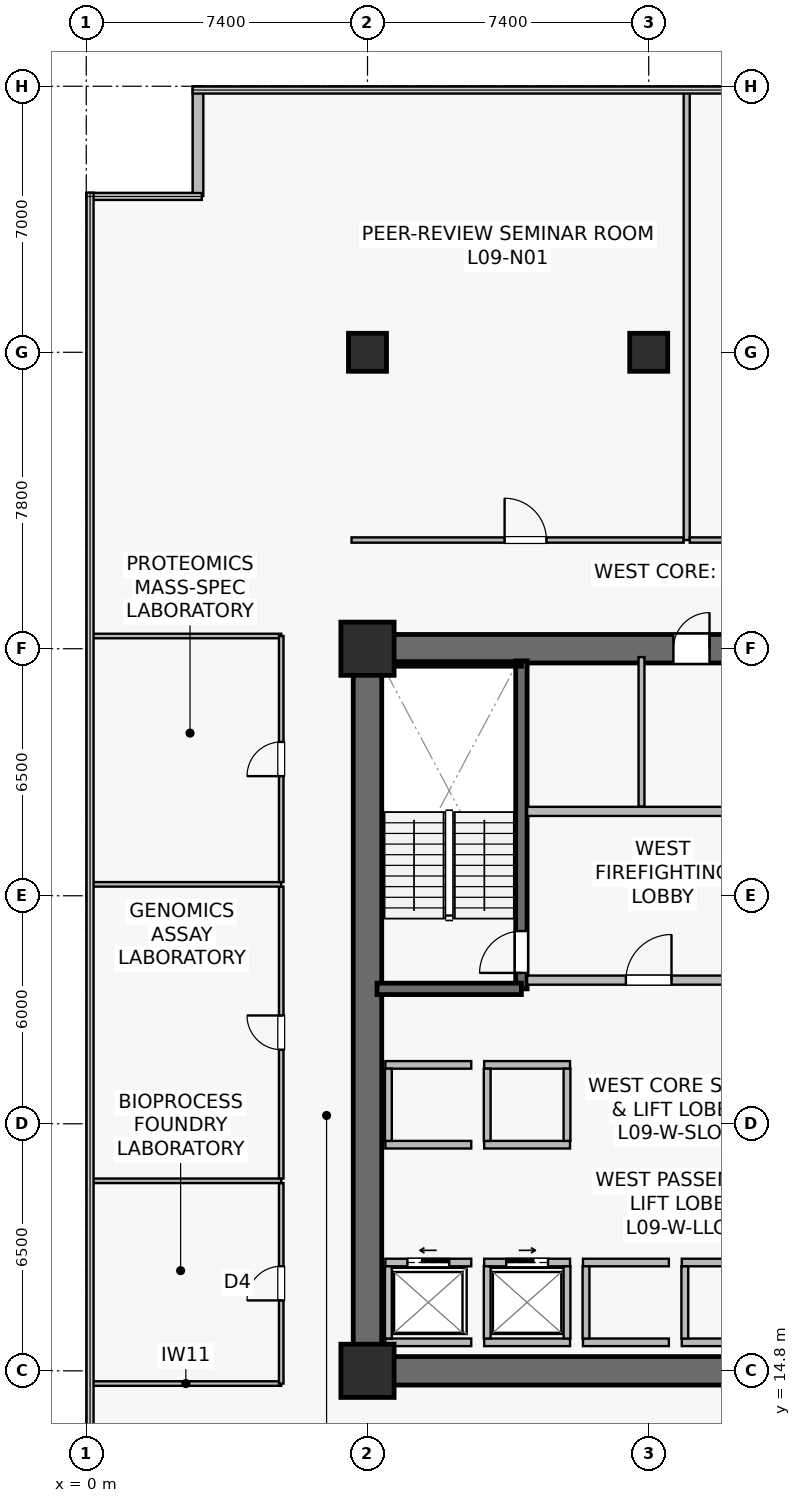
"""IFC4 building model, lengths in metres.
Left out: names, types, materials, properties, quantities, classifications, styles, units other than length and angle.
Written with IfcOpenShell. Run it as: python <this file> out.ifc"""

import sys

from ifc_helpers import new_model, si_unit, direction, frame, frame_2d, origin, origin_2d, place, context, subcontext, project, spatial, rectangle, extrude, source, transform, mapped, element, fill, save


model = new_model("IFC4")
c1 = context("Model", 3, precision=1e-05, world=origin(), true_north=direction((0.0, 1.0)))
c2 = subcontext(c1, "Body", "Model", "MODEL_VIEW")
j1 = project(units=[si_unit("LENGTHUNIT", "METRE"), si_unit("PLANEANGLEUNIT", "RADIAN")], contexts=[c1])
p1 = place(None, origin())
s1 = spatial("IfcSite", under=j1, at=p1, CompositionType="ELEMENT")
p2 = place(p1, origin())
s2 = spatial("IfcBuilding", under=s1, at=p2, CompositionType="ELEMENT")
p3 = place(p2, frame((0.0, 0.0, 37.5)))
s3 = spatial("IfcBuildingStorey", under=s2, at=p3, CompositionType="ELEMENT", Elevation=37.5)
p4 = place(p3, frame((7.025, 14.8, 0.0), z_axis=(0.0, 0.0, 1.0), x_axis=(1.0, 0.0, 0.0)))
e1 = element("IfcWall", 1, at=p4, inside=s3, PredefinedType="SHEAR", context=c2, shape_type="SweptSolid", body=[
    extrude(rectangle(XDim=15.55, YDim=0.75, at=frame_2d((7.775, 0.0))), origin(), (0.0, 0.0, 1.0), 3.78),
])
p5 = place(p3, frame((7.025, 33.8, 0.0), z_axis=(0.0, 0.0, 1.0), x_axis=(1.0, 0.0, 0.0)))
e2 = element("IfcWall", 2, at=p5, inside=s3, PredefinedType="SHEAR", context=c2, shape_type="SweptSolid", body=[
    extrude(rectangle(XDim=15.55, YDim=0.75, at=frame_2d((7.775, 0.0))), origin(), (0.0, 0.0, 1.0), 3.78),
])
p6 = place(p5, frame((8.425, 0.0, 0.0)))
e3 = element("IfcOpeningElement", 3, at=p6, cuts=e2, PredefinedType="OPENING", context=c2, shape_type="SweptSolid", body=[
    extrude(rectangle(XDim=0.95, YDim=2.15, at=frame_2d((0.475, 1.075))), frame((0.0, 0.385, 0.0), z_axis=(0.0, -1.0, 0.0), x_axis=(1.0, 0.0, 0.0)), (0.0, 0.0, 1.0), 0.77),
])
p7 = place(p5, frame((11.965, 0.0, 0.0)))
e4 = element("IfcOpeningElement", 4, at=p7, cuts=e2, PredefinedType="OPENING", context=c2, shape_type="SweptSolid", body=[
    extrude(rectangle(XDim=0.95, YDim=2.15, at=frame_2d((0.475, 1.075))), frame((0.0, 0.385, 0.0), z_axis=(0.0, -1.0, 0.0), x_axis=(1.0, 0.0, 0.0)), (0.0, 0.0, 1.0), 0.77),
])
p8 = place(p3, frame((7.4, 15.175, 0.0), z_axis=(0.0, 0.0, 1.0), x_axis=(0.0, 1.0, 0.0)))
e5 = element("IfcWall", 5, at=p8, inside=s3, PredefinedType="SHEAR", context=c2, shape_type="SweptSolid", body=[
    extrude(rectangle(XDim=18.25, YDim=0.75, at=frame_2d((9.125, 0.0))), origin(), (0.0, 0.0, 1.0), 3.78),
])
p9 = place(p3, frame((11.45, 24.85, 0.0), z_axis=(0.0, 0.0, 1.0), x_axis=(0.0, 1.0, 0.0)))
e6 = element("IfcWall", 6, at=p9, inside=s3, PredefinedType="SHEAR", context=c2, shape_type="SweptSolid", body=[
    extrude(rectangle(XDim=8.63, YDim=0.3, at=frame_2d((4.315, 0.0))), origin(), (0.0, 0.0, 1.0), 3.78),
])
p10 = place(p9, frame((0.42, 0.0, 0.0)))
e7 = element("IfcOpeningElement", 7, at=p10, cuts=e6, PredefinedType="OPENING", context=c2, shape_type="SweptSolid", body=[
    extrude(rectangle(XDim=1.1, YDim=2.15, at=frame_2d((0.55, 1.075))), frame((0.0, 0.16, 0.0), z_axis=(0.0, -1.0, 0.0), x_axis=(1.0, 0.0, 0.0)), (0.0, 0.0, 1.0), 0.32),
])
p11 = place(p3, frame((7.65, 24.85, 0.0), z_axis=(0.0, 0.0, 1.0), x_axis=(1.0, 0.0, 0.0)))
e8 = element("IfcWall", 8, at=p11, inside=s3, PredefinedType="SHEAR", context=c2, shape_type="SweptSolid", body=[
    extrude(rectangle(XDim=3.8, YDim=0.3, at=frame_2d((1.9, 0.0))), origin(), (0.0, 0.0, 1.0), 3.78),
])
p12 = place(p3, frame((7.73, 33.4, 0.0), z_axis=(0.0, 0.0, 1.0), x_axis=(1.0, 0.0, 0.0)))
e9 = element("IfcWall", 9, at=p12, inside=s3, PredefinedType="SOLIDWALL", context=c2, shape_type="SweptSolid", body=[
    extrude(rectangle(XDim=3.72, YDim=0.12, at=frame_2d((1.86, 0.0))), origin(), (0.0, 0.0, 1.0), 3.78),
])
m1 = source(origin(), c2, "Body", "SweptSolid", [
    extrude(rectangle(XDim=1.4, YDim=1.4, at=origin_2d()), origin(), (0.0, 0.0, 1.0), 4.1),
])
for number, where, z_axis, x_axis in (
    (10, (7.4, 14.8, 0.0), (0.0, 0.0, 1.0), (1.0, 0.0, 0.0)),
    (11, (7.4, 33.8, 0.0), (0.0, 0.0, 1.0), (1.0, 0.0, 0.0)),
):
    element("IfcColumn", number, at=place(p3, frame(where, z_axis=z_axis, x_axis=x_axis)), inside=s3, PredefinedType="COLUMN", context=c2, shape_type="MappedRepresentation", body=[
        mapped(m1, transform((0.0, 0.0, 0.0), scale=1.0)),
    ])
m2 = source(origin(), c2, "Body", "SweptSolid", [
    extrude(rectangle(XDim=1.0, YDim=1.0, at=origin_2d()), origin(), (0.0, 0.0, 1.0), 4.1),
])
for number, where, z_axis, x_axis in (
    (12, (14.8, 41.6, 0.0), (0.0, 0.0, 1.0), (1.0, 0.0, 0.0)),
    (13, (7.4, 41.6, 0.0), (0.0, 0.0, 1.0), (1.0, 0.0, 0.0)),
):
    element("IfcColumn", number, at=place(p3, frame(where, z_axis=z_axis, x_axis=x_axis)), inside=s3, PredefinedType="COLUMN", context=c2, shape_type="MappedRepresentation", body=[
        mapped(m2, transform((0.0, 0.0, 0.0), scale=1.0)),
    ])
p13 = place(p3, frame((2.94, 48.6, 0.0), z_axis=(0.0, 0.0, 1.0), x_axis=(0.0, -1.0, 0.0)))
e14 = element("IfcWall", 14, at=p13, inside=s3, PredefinedType="STANDARD", context=c2, shape_type="SweptSolid", body=[
    extrude(rectangle(XDim=2.888, YDim=0.28, at=frame_2d((1.444, 0.0))), origin(), (0.0, 0.0, 1.0), 3.78),
])
p14 = place(p3, frame((11.6, 25.08, 0.0), z_axis=(0.0, 0.0, 1.0), x_axis=(1.0, 0.0, 0.0)))
e15 = element("IfcWall", 15, at=p14, inside=s3, PredefinedType="SOLIDWALL", context=c2, shape_type="SweptSolid", body=[
    extrude(rectangle(XDim=6.92, YDim=0.24, at=frame_2d((3.46, 0.0))), origin(), (0.0, 0.0, 1.0), 3.065),
])
p15 = place(p14, frame((2.6, 0.0, 0.0)))
e16 = element("IfcOpeningElement", 16, at=p15, cuts=e15, PredefinedType="OPENING", context=c2, shape_type="SweptSolid", body=[
    extrude(rectangle(XDim=1.2, YDim=2.16, at=frame_2d((0.6, 1.08))), frame((0.0, 0.13, 0.0), z_axis=(0.0, -1.0, 0.0), x_axis=(1.0, 0.0, 0.0)), (0.0, 0.0, 1.0), 0.26),
])
p16 = place(p3, frame((11.6, 29.52, 0.0), z_axis=(0.0, 0.0, 1.0), x_axis=(1.0, 0.0, 0.0)))
e17 = element("IfcWall", 17, at=p16, inside=s3, PredefinedType="SOLIDWALL", context=c2, shape_type="SweptSolid", body=[
    extrude(rectangle(XDim=6.92, YDim=0.24, at=frame_2d((3.46, 0.0))), origin(), (0.0, 0.0, 1.0), 3.065),
])
p17 = place(p3, frame((7.87, 17.65, 0.0), z_axis=(0.0, 0.0, 1.0), x_axis=(1.0, 0.0, 0.0)))
e18 = element("IfcWall", 18, at=p17, inside=s3, PredefinedType="SOLIDWALL", context=c2, shape_type="SweptSolid", body=[
    extrude(rectangle(XDim=2.26, YDim=0.2, at=frame_2d((1.13, 0.0))), origin(), (0.0, 0.0, 1.0), 3.78),
])
p18 = place(p17, frame((0.58, 0.0, 0.0)))
e19 = element("IfcOpeningElement", 19, at=p18, cuts=e18, PredefinedType="OPENING", context=c2, shape_type="SweptSolid", body=[
    extrude(rectangle(XDim=1.1, YDim=2.22, at=frame_2d((0.55, 1.11))), frame((0.0, 0.11, 0.0), z_axis=(0.0, -1.0, 0.0), x_axis=(1.0, 0.0, 0.0)), (0.0, 0.0, 1.0), 0.22),
])
p19 = place(p3, frame((7.87, 15.55, 0.0), z_axis=(0.0, 0.0, 1.0), x_axis=(1.0, 0.0, 0.0)))
e20 = element("IfcWall", 20, at=p19, inside=s3, PredefinedType="SOLIDWALL", context=c2, shape_type="SweptSolid", body=[
    extrude(rectangle(XDim=2.26, YDim=0.2, at=frame_2d((1.13, 0.0))), origin(), (0.0, 0.0, 1.0), 3.78),
])
p20 = place(p3, frame((7.95, 15.65, 0.0), z_axis=(0.0, 0.0, 1.0), x_axis=(0.0, 1.0, 0.0)))
e21 = element("IfcWall", 21, at=p20, inside=s3, PredefinedType="SOLIDWALL", context=c2, shape_type="SweptSolid", body=[
    extrude(rectangle(XDim=1.9, YDim=0.18, at=frame_2d((0.95, 0.0))), origin(), (0.0, 0.0, 1.0), 3.78),
])
p21 = place(p3, frame((10.47, 17.65, 0.0), z_axis=(0.0, 0.0, 1.0), x_axis=(1.0, 0.0, 0.0)))
e22 = element("IfcWall", 22, at=p21, inside=s3, PredefinedType="SOLIDWALL", context=c2, shape_type="SweptSolid", body=[
    extrude(rectangle(XDim=2.26, YDim=0.2, at=frame_2d((1.13, 0.0))), origin(), (0.0, 0.0, 1.0), 3.78),
])
p22 = place(p21, frame((0.58, 0.0, 0.0)))
e23 = element("IfcOpeningElement", 23, at=p22, cuts=e22, PredefinedType="OPENING", context=c2, shape_type="SweptSolid", body=[
    extrude(rectangle(XDim=1.1, YDim=2.22, at=frame_2d((0.55, 1.11))), frame((0.0, 0.11, 0.0), z_axis=(0.0, -1.0, 0.0), x_axis=(1.0, 0.0, 0.0)), (0.0, 0.0, 1.0), 0.22),
])
p23 = place(p3, frame((10.47, 15.55, 0.0), z_axis=(0.0, 0.0, 1.0), x_axis=(1.0, 0.0, 0.0)))
e24 = element("IfcWall", 24, at=p23, inside=s3, PredefinedType="SOLIDWALL", context=c2, shape_type="SweptSolid", body=[
    extrude(rectangle(XDim=2.26, YDim=0.2, at=frame_2d((1.13, 0.0))), origin(), (0.0, 0.0, 1.0), 3.78),
])
for number, where, z_axis, x_axis in (
    (25, (10.55, 15.65, 0.0), (0.0, 0.0, 1.0), (0.0, 1.0, 0.0)),
    (26, (12.65, 15.65, 0.0), (0.0, 0.0, 1.0), (0.0, 1.0, 0.0)),
):
    element("IfcWall", number, at=place(p3, frame(where, z_axis=z_axis, x_axis=x_axis)), inside=s3, PredefinedType="SOLIDWALL", context=c2, shape_type="SweptSolid", body=[
        extrude(rectangle(XDim=1.9, YDim=0.18, at=frame_2d((0.95, 0.0))), origin(), (0.0, 0.0, 1.0), 3.78),
    ])
for number, where, z_axis, x_axis in (
    (27, (13.07, 17.65, 0.0), (0.0, 0.0, 1.0), (1.0, 0.0, 0.0)),
    (28, (13.07, 15.55, 0.0), (0.0, 0.0, 1.0), (1.0, 0.0, 0.0)),
):
    element("IfcWall", number, at=place(p3, frame(where, z_axis=z_axis, x_axis=x_axis)), inside=s3, PredefinedType="SOLIDWALL", context=c2, shape_type="SweptSolid", body=[
        extrude(rectangle(XDim=2.26, YDim=0.2, at=frame_2d((1.13, 0.0))), origin(), (0.0, 0.0, 1.0), 3.065),
    ])
p24 = place(p3, frame((13.15, 15.65, 0.0), z_axis=(0.0, 0.0, 1.0), x_axis=(0.0, 1.0, 0.0)))
e29 = element("IfcWall", 29, at=p24, inside=s3, PredefinedType="SOLIDWALL", context=c2, shape_type="SweptSolid", body=[
    extrude(rectangle(XDim=1.9, YDim=0.18, at=frame_2d((0.95, 0.0))), origin(), (0.0, 0.0, 1.0), 3.78),
])
for number, where, z_axis, x_axis in (
    (30, (15.67, 17.65, 0.0), (0.0, 0.0, 1.0), (1.0, 0.0, 0.0)),
    (31, (15.67, 15.55, 0.0), (0.0, 0.0, 1.0), (1.0, 0.0, 0.0)),
):
    element("IfcWall", number, at=place(p3, frame(where, z_axis=z_axis, x_axis=x_axis)), inside=s3, PredefinedType="SOLIDWALL", context=c2, shape_type="SweptSolid", body=[
        extrude(rectangle(XDim=2.26, YDim=0.2, at=frame_2d((1.13, 0.0))), origin(), (0.0, 0.0, 1.0), 3.78),
    ])
p25 = place(p3, frame((15.75, 15.65, 0.0), z_axis=(0.0, 0.0, 1.0), x_axis=(0.0, 1.0, 0.0)))
e32 = element("IfcWall", 32, at=p25, inside=s3, PredefinedType="SOLIDWALL", context=c2, shape_type="SweptSolid", body=[
    extrude(rectangle(XDim=1.9, YDim=0.18, at=frame_2d((0.95, 0.0))), origin(), (0.0, 0.0, 1.0), 3.78),
])
for number, where, z_axis, x_axis in (
    (33, (7.87, 20.75, 0.0), (0.0, 0.0, 1.0), (1.0, 0.0, 0.0)),
    (34, (7.87, 22.85, 0.0), (0.0, 0.0, 1.0), (1.0, 0.0, 0.0)),
):
    element("IfcWall", number, at=place(p3, frame(where, z_axis=z_axis, x_axis=x_axis)), inside=s3, PredefinedType="SOLIDWALL", context=c2, shape_type="SweptSolid", body=[
        extrude(rectangle(XDim=2.26, YDim=0.2, at=frame_2d((1.13, 0.0))), origin(), (0.0, 0.0, 1.0), 3.78),
    ])
p26 = place(p3, frame((7.95, 20.85, 0.0), z_axis=(0.0, 0.0, 1.0), x_axis=(0.0, 1.0, 0.0)))
e35 = element("IfcWall", 35, at=p26, inside=s3, PredefinedType="SOLIDWALL", context=c2, shape_type="SweptSolid", body=[
    extrude(rectangle(XDim=1.9, YDim=0.18, at=frame_2d((0.95, 0.0))), origin(), (0.0, 0.0, 1.0), 3.78),
])
for number, where, z_axis, x_axis in (
    (36, (10.47, 20.75, 0.0), (0.0, 0.0, 1.0), (1.0, 0.0, 0.0)),
    (37, (10.47, 22.85, 0.0), (0.0, 0.0, 1.0), (1.0, 0.0, 0.0)),
):
    element("IfcWall", number, at=place(p3, frame(where, z_axis=z_axis, x_axis=x_axis)), inside=s3, PredefinedType="SOLIDWALL", context=c2, shape_type="SweptSolid", body=[
        extrude(rectangle(XDim=2.26, YDim=0.2, at=frame_2d((1.13, 0.0))), origin(), (0.0, 0.0, 1.0), 3.78),
    ])
for number, where, z_axis, x_axis in (
    (38, (10.55, 20.85, 0.0), (0.0, 0.0, 1.0), (0.0, 1.0, 0.0)),
    (39, (12.65, 20.85, 0.0), (0.0, 0.0, 1.0), (0.0, 1.0, 0.0)),
):
    element("IfcWall", number, at=place(p3, frame(where, z_axis=z_axis, x_axis=x_axis)), inside=s3, PredefinedType="SOLIDWALL", context=c2, shape_type="SweptSolid", body=[
        extrude(rectangle(XDim=1.9, YDim=0.18, at=frame_2d((0.95, 0.0))), origin(), (0.0, 0.0, 1.0), 3.78),
    ])
p27 = place(p3, frame((14.61, 29.65, 0.0), z_axis=(0.0, 0.0, 1.0), x_axis=(0.0, 1.0, 0.0)))
e40 = element("IfcWall", 40, at=p27, inside=s3, PredefinedType="PLUMBINGWALL", context=c2, shape_type="SweptSolid", body=[
    extrude(rectangle(XDim=3.93, YDim=0.155, at=frame_2d((1.965, 0.0))), origin(), (0.0, 0.0, 1.0), 3.065),
])
p28 = place(p3, frame((6.98, 36.66, 0.0), z_axis=(0.0, 0.0, 1.0), x_axis=(1.0, 0.0, 0.0)))
e41 = element("IfcWall", 41, at=p28, inside=s3, PredefinedType="PARTITIONING", context=c2, shape_type="SweptSolid", body=[
    extrude(rectangle(XDim=8.74, YDim=0.14, at=frame_2d((4.37, 0.0))), origin(), (0.0, 0.0, 1.0), 3.065),
])
p29 = place(p28, frame((4.028, 0.0, 0.0)))
e42 = element("IfcOpeningElement", 42, at=p29, cuts=e41, PredefinedType="OPENING", context=c2, shape_type="SweptSolid", body=[
    extrude(rectangle(XDim=1.1, YDim=2.18, at=frame_2d((0.55, 1.09))), frame((0.0, 0.08, 0.0), z_axis=(0.0, -1.0, 0.0), x_axis=(1.0, 0.0, 0.0)), (0.0, 0.0, 1.0), 0.16),
])
p30 = place(p3, frame((15.8, 36.66, 0.0), z_axis=(0.0, 0.0, 1.0), x_axis=(0.0, 1.0, 0.0)))
e43 = element("IfcWall", 43, at=p30, inside=s3, PredefinedType="PARTITIONING", context=c2, shape_type="SweptSolid", body=[
    extrude(rectangle(XDim=11.83, YDim=0.16, at=frame_2d((5.915, 0.0))), origin(), (0.0, 0.0, 1.0), 3.015),
])
p31 = place(p3, frame((15.88, 36.66, 0.0), z_axis=(0.0, 0.0, 1.0), x_axis=(1.0, 0.0, 0.0)))
e44 = element("IfcWall", 44, at=p31, inside=s3, PredefinedType="PARTITIONING", context=c2, shape_type="SweptSolid", body=[
    extrude(rectangle(XDim=14.84, YDim=0.14, at=frame_2d((7.42, 0.0))), origin(), (0.0, 0.0, 1.0), 3.065),
])
p32 = place(p31, frame((5.696, 0.0, 0.0)))
e45 = element("IfcOpeningElement", 45, at=p32, cuts=e44, PredefinedType="OPENING", context=c2, shape_type="SweptSolid", body=[
    extrude(rectangle(XDim=1.1, YDim=2.18, at=frame_2d((0.55, 1.09))), frame((0.0, 0.08, 0.0), z_axis=(0.0, -1.0, 0.0), x_axis=(1.0, 0.0, 0.0)), (0.0, 0.0, 1.0), 0.16),
])
for number, where, z_axis, x_axis in (
    (46, (0.11, 14.465, 0.0), (0.0, 0.0, 1.0), (1.0, 0.0, 0.0)),
    (47, (0.11, 34.135, 0.0), (0.0, 0.0, 1.0), (1.0, 0.0, 0.0)),
):
    element("IfcWall", number, at=place(p3, frame(where, z_axis=z_axis, x_axis=x_axis)), inside=s3, PredefinedType="PARTITIONING", context=c2, shape_type="SweptSolid", body=[
        extrude(rectangle(XDim=5.02, YDim=0.12, at=frame_2d((2.51, 0.0))), origin(), (0.0, 0.0, 1.0), 3.78),
    ])
p33 = place(p3, frame((5.13, 14.465, 0.0), z_axis=(0.0, 0.0, 1.0), x_axis=(0.0, 1.0, 0.0)))
e48 = element("IfcWall", 48, at=p33, inside=s3, PredefinedType="PARTITIONING", context=c2, shape_type="SweptSolid", body=[
    extrude(rectangle(XDim=5.275, YDim=0.12, at=frame_2d((2.637, 0.0))), origin(), (0.0, 0.0, 1.0), 3.78),
])
p34 = place(p33, frame((2.188, 0.0, 0.0)))
e49 = element("IfcOpeningElement", 49, at=p34, cuts=e48, PredefinedType="OPENING", context=c2, shape_type="SweptSolid", body=[
    extrude(rectangle(XDim=0.9, YDim=2.1, at=frame_2d((0.45, 1.05))), frame((0.0, 0.07, 0.0), z_axis=(0.0, -1.0, 0.0), x_axis=(1.0, 0.0, 0.0)), (0.0, 0.0, 1.0), 0.14),
])
p35 = place(p3, frame((0.11, 19.8, 0.0), z_axis=(0.0, 0.0, 1.0), x_axis=(1.0, 0.0, 0.0)))
e50 = element("IfcWall", 50, at=p35, inside=s3, PredefinedType="PARTITIONING", context=c2, shape_type="SweptSolid", body=[
    extrude(rectangle(XDim=5.02, YDim=0.12, at=frame_2d((2.51, 0.0))), origin(), (0.0, 0.0, 1.0), 3.78),
])
p36 = place(p3, frame((5.13, 19.86, 0.0), z_axis=(0.0, 0.0, 1.0), x_axis=(0.0, 1.0, 0.0)))
e51 = element("IfcWall", 51, at=p36, inside=s3, PredefinedType="PARTITIONING", context=c2, shape_type="SweptSolid", body=[
    extrude(rectangle(XDim=7.68, YDim=0.12, at=frame_2d((3.84, 0.0))), origin(), (0.0, 0.0, 1.0), 3.78),
])
p37 = place(p36, frame((3.39, 0.0, 0.0)))
e52 = element("IfcOpeningElement", 52, at=p37, cuts=e51, PredefinedType="OPENING", context=c2, shape_type="SweptSolid", body=[
    extrude(rectangle(XDim=0.9, YDim=2.1, at=frame_2d((0.45, 1.05))), frame((0.0, 0.07, 0.0), z_axis=(0.0, -1.0, 0.0), x_axis=(1.0, 0.0, 0.0)), (0.0, 0.0, 1.0), 0.14),
])
p38 = place(p3, frame((0.11, 27.6, 0.0), z_axis=(0.0, 0.0, 1.0), x_axis=(1.0, 0.0, 0.0)))
e53 = element("IfcWall", 53, at=p38, inside=s3, PredefinedType="PARTITIONING", context=c2, shape_type="SweptSolid", body=[
    extrude(rectangle(XDim=5.02, YDim=0.12, at=frame_2d((2.51, 0.0))), origin(), (0.0, 0.0, 1.0), 3.78),
])
p39 = place(p3, frame((5.13, 27.66, 0.0), z_axis=(0.0, 0.0, 1.0), x_axis=(0.0, 1.0, 0.0)))
e54 = element("IfcWall", 54, at=p39, inside=s3, PredefinedType="PARTITIONING", context=c2, shape_type="SweptSolid", body=[
    extrude(rectangle(XDim=6.475, YDim=0.12, at=frame_2d((3.238, 0.0))), origin(), (0.0, 0.0, 1.0), 3.78),
])
p40 = place(p39, frame((2.788, 0.0, 0.0)))
e55 = element("IfcOpeningElement", 55, at=p40, cuts=e54, PredefinedType="OPENING", context=c2, shape_type="SweptSolid", body=[
    extrude(rectangle(XDim=0.9, YDim=2.1, at=frame_2d((0.45, 1.05))), frame((0.0, 0.07, 0.0), z_axis=(0.0, -1.0, 0.0), x_axis=(1.0, 0.0, 0.0)), (0.0, 0.0, 1.0), 0.14),
])
m3 = source(origin(), c2, "Body", "SweptSolid", [
    extrude(rectangle(XDim=1.1, YDim=2.15, at=frame_2d((0.55, 1.075))), frame((0.0, 0.025, 0.0), z_axis=(0.0, -1.0, 0.0), x_axis=(1.0, 0.0, 0.0)), (0.0, 0.0, 1.0), 0.05),
])
p41 = place(p10, origin())
e56 = element("IfcDoor", 56, at=p41, inside=s3, OperationType="SINGLE_SWING_LEFT", PredefinedType="DOOR", context=c2, shape_type="MappedRepresentation", body=[
    mapped(m3, transform((0.0, 0.0, 0.0), scale=1.0)),
])
fill(e7, e56)
m4 = source(origin(), c2, "Body", "SweptSolid", [
    extrude(rectangle(XDim=1.2, YDim=2.16, at=frame_2d((0.6, 1.08))), frame((0.0, 0.025, 0.0), z_axis=(0.0, -1.0, 0.0), x_axis=(1.0, 0.0, 0.0)), (0.0, 0.0, 1.0), 0.05),
])
p42 = place(p15, origin())
e57 = element("IfcDoor", 57, at=p42, inside=s3, OperationType="SINGLE_SWING_RIGHT", PredefinedType="DOOR", context=c2, shape_type="MappedRepresentation", body=[
    mapped(m4, transform((0.0, 0.0, 0.0), scale=1.0)),
])
fill(e16, e57)
m5 = source(origin(), c2, "Body", "SweptSolid", [
    extrude(rectangle(XDim=1.1, YDim=2.22, at=frame_2d((0.55, 1.11))), frame((0.0, 0.025, 0.0), z_axis=(0.0, -1.0, 0.0), x_axis=(1.0, 0.0, 0.0)), (0.0, 0.0, 1.0), 0.05),
])
p43 = place(p18, origin())
e58 = element("IfcDoor", 58, at=p43, inside=s3, OperationType="SLIDING_TO_LEFT", PredefinedType="USERDEFINED", context=c2, shape_type="MappedRepresentation", body=[
    mapped(m5, transform((0.0, 0.0, 0.0), scale=1.0)),
])
fill(e19, e58)
p44 = place(p22, origin())
e59 = element("IfcDoor", 59, at=p44, inside=s3, OperationType="SLIDING_TO_RIGHT", PredefinedType="USERDEFINED", context=c2, shape_type="MappedRepresentation", body=[
    mapped(m5, transform((0.0, 0.0, 0.0), scale=1.0)),
])
fill(e23, e59)
m6 = source(origin(), c2, "Body", "SweptSolid", [
    extrude(rectangle(XDim=0.95, YDim=2.15, at=frame_2d((0.475, 1.075))), frame((0.0, 0.025, 0.0), z_axis=(0.0, -1.0, 0.0), x_axis=(1.0, 0.0, 0.0)), (0.0, 0.0, 1.0), 0.05),
])
p45 = place(p6, origin())
e60 = element("IfcDoor", 60, at=p45, inside=s3, OperationType="SINGLE_SWING_RIGHT", PredefinedType="DOOR", context=c2, shape_type="MappedRepresentation", body=[
    mapped(m6, transform((0.0, 0.0, 0.0), scale=1.0)),
])
fill(e3, e60)
m7 = source(origin(), c2, "Body", "SweptSolid", [
    extrude(rectangle(XDim=1.1, YDim=2.18, at=frame_2d((0.55, 1.09))), frame((0.0, 0.025, 0.0), z_axis=(0.0, -1.0, 0.0), x_axis=(1.0, 0.0, 0.0)), (0.0, 0.0, 1.0), 0.05),
])
p46 = place(p29, origin())
e61 = element("IfcDoor", 61, at=p46, inside=s3, OperationType="SINGLE_SWING_LEFT", PredefinedType="DOOR", context=c2, shape_type="MappedRepresentation", body=[
    mapped(m7, transform((0.0, 0.0, 0.0), scale=1.0)),
])
fill(e42, e61)
m8 = source(origin(), c2, "Body", "SweptSolid", [
    extrude(rectangle(XDim=0.9, YDim=2.1, at=frame_2d((0.45, 1.05))), frame((0.0, 0.025, 0.0), z_axis=(0.0, -1.0, 0.0), x_axis=(1.0, 0.0, 0.0)), (0.0, 0.0, 1.0), 0.05),
])
p47 = place(p34, origin())
e62 = element("IfcDoor", 62, at=p47, inside=s3, OperationType="SINGLE_SWING_LEFT", PredefinedType="DOOR", context=c2, shape_type="MappedRepresentation", body=[
    mapped(m8, transform((0.0, 0.0, 0.0), scale=1.0)),
])
fill(e49, e62)
p48 = place(p37, origin())
e63 = element("IfcDoor", 63, at=p48, inside=s3, OperationType="SINGLE_SWING_RIGHT", PredefinedType="DOOR", context=c2, shape_type="MappedRepresentation", body=[
    mapped(m8, transform((0.0, 0.0, 0.0), scale=1.0)),
])
fill(e52, e63)
p49 = place(p40, origin())
e64 = element("IfcDoor", 64, at=p49, inside=s3, OperationType="SINGLE_SWING_LEFT", PredefinedType="DOOR", context=c2, shape_type="MappedRepresentation", body=[
    mapped(m8, transform((0.0, 0.0, 0.0), scale=1.0)),
])
fill(e55, e64)
save(model, sys.argv[1])
